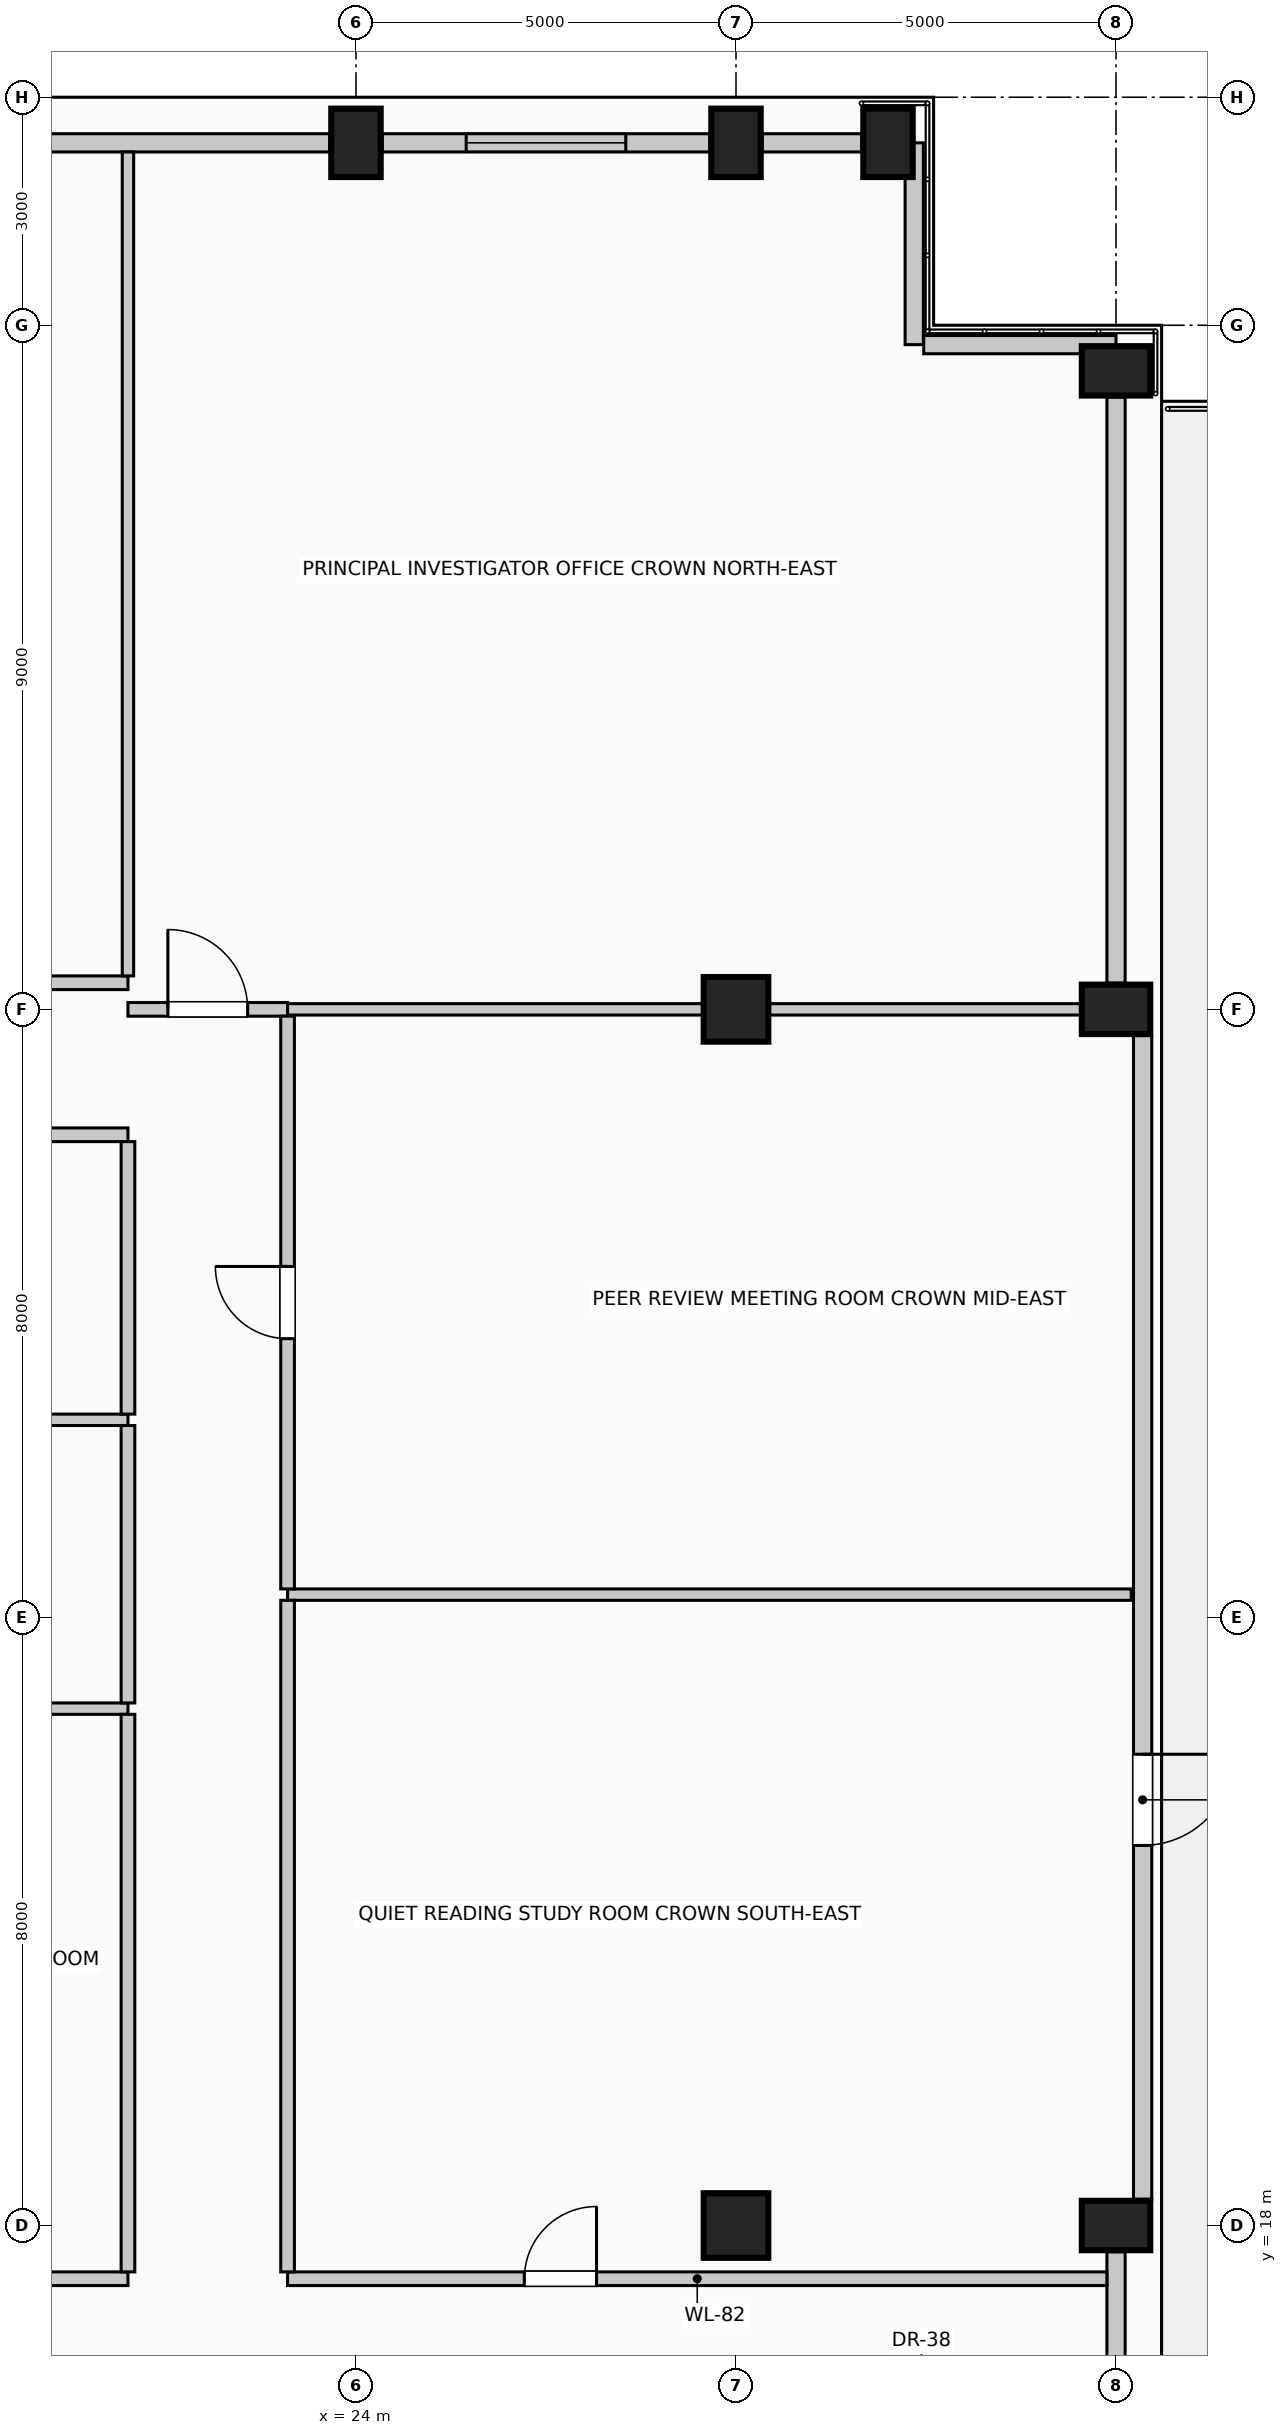
"""IFC4 building model, lengths in metres.
Left out: names, types, materials, properties, quantities, classifications, styles, units other than length and angle.
Written with IfcOpenShell. Run it as: python <this file> out.ifc"""

import sys

from ifc_helpers import new_model, si_unit, direction, frame, frame_2d, origin, origin_2d, place, context, subcontext, project, spatial, rectangle, circle, extrude, element, fill, save


model = new_model("IFC4")
c1 = context("Model", 3, precision=1e-05, world=origin(), true_north=direction((0.0, 1.0)))
c2 = subcontext(c1, "Body", "Model", "MODEL_VIEW")
j1 = project(units=[si_unit("LENGTHUNIT", "METRE"), si_unit("PLANEANGLEUNIT", "RADIAN")], contexts=[c1])
p1 = place(None, origin())
s1 = spatial("IfcSite", under=j1, at=p1, CompositionType="ELEMENT")
p2 = place(p1, origin())
s2 = spatial("IfcBuilding", under=s1, at=p2, CompositionType="ELEMENT")
p3 = place(p2, frame((0.0, 0.0, 305.0)))
s3 = spatial("IfcBuildingStorey", under=s2, at=p3, CompositionType="ELEMENT", Elevation=305.0)
for number, where, z_axis, x_axis in (
    (1, (24.0, 45.4, 0.0), (0.0, 0.0, 1.0), (1.0, 0.0, 0.0)),
    (2, (29.0, 45.4, 0.0), (0.0, 0.0, 1.0), (1.0, 0.0, 0.0)),
    (3, (31.0, 45.4, 0.0), (0.0, 0.0, 1.0), (1.0, 0.0, 0.0)),
    (4, (34.0, 18.0, 0.0), (0.0, 0.0, 1.0), (0.0, 1.0, 0.0)),
    (5, (34.0, 34.0, 0.0), (0.0, 0.0, 1.0), (0.0, 1.0, 0.0)),
    (6, (34.0, 42.4, 0.0), (0.0, 0.0, 1.0), (0.0, 1.0, 0.0)),
):
    element("IfcColumn", number, at=place(p3, frame(where, z_axis=z_axis, x_axis=x_axis)), inside=s3, PredefinedType="COLUMN", context=c2, shape_type="SweptSolid", body=[
        extrude(rectangle(XDim=0.65, YDim=0.9, at=origin_2d()), origin(), (0.0, 0.0, 1.0), 4.0),
    ])
for number, where, z_axis, x_axis in (
    (7, (29.0, 18.0, 0.0), (0.0, 0.0, 1.0), (1.0, 0.0, 0.0)),
    (8, (29.0, 34.0, 0.0), (0.0, 0.0, 1.0), (1.0, 0.0, 0.0)),
):
    element("IfcColumn", number, at=place(p3, frame(where, z_axis=z_axis, x_axis=x_axis)), inside=s3, PredefinedType="COLUMN", context=c2, shape_type="SweptSolid", body=[
        extrude(circle(Radius=0.425, at=origin_2d()), origin(), (0.0, 0.0, 1.0), 4.0),
    ])
p4 = place(p3, frame((16.745, 45.4, 0.0), z_axis=(0.0, 0.0, 1.0), x_axis=(1.0, 0.0, 0.0)))
e9 = element("IfcWall", 9, at=p4, inside=s3, PredefinedType="SOLIDWALL", context=c2, shape_type="SweptSolid", body=[
    extrude(rectangle(XDim=6.91, YDim=0.24, at=frame_2d((3.455, 0.0))), origin(), (0.0, 0.0, 1.0), 3.025),
])
p5 = place(p3, frame((24.345, 45.4, 0.0), z_axis=(0.0, 0.0, 1.0), x_axis=(1.0, 0.0, 0.0)))
e10 = element("IfcWall", 10, at=p5, inside=s3, PredefinedType="SOLIDWALL", context=c2, shape_type="SweptSolid", body=[
    extrude(rectangle(XDim=4.31, YDim=0.24, at=frame_2d((2.155, 0.0))), origin(), (0.0, 0.0, 1.0), 3.025),
])
p6 = place(p5, frame((1.105, 0.0, 0.35)))
e11 = element("IfcOpeningElement", 11, at=p6, cuts=e10, PredefinedType="OPENING", context=c2, shape_type="SweptSolid", body=[
    extrude(rectangle(XDim=2.1, YDim=2.2, at=frame_2d((1.05, 1.1))), frame((0.0, 0.13, 0.0), z_axis=(0.0, -1.0, 0.0), x_axis=(1.0, 0.0, 0.0)), (0.0, 0.0, 1.0), 0.26),
])
p7 = place(p3, frame((29.345, 45.4, 0.0), z_axis=(0.0, 0.0, 1.0), x_axis=(1.0, 0.0, 0.0)))
e12 = element("IfcWall", 12, at=p7, inside=s3, PredefinedType="SOLIDWALL", context=c2, shape_type="SweptSolid", body=[
    extrude(rectangle(XDim=1.31, YDim=0.24, at=frame_2d((0.655, 0.0))), origin(), (0.0, 0.0, 1.0), 3.025),
])
p8 = place(p3, frame((34.0, 17.655, 0.0), z_axis=(0.0, 0.0, 1.0), x_axis=(0.0, -1.0, 0.0)))
e13 = element("IfcWall", 13, at=p8, inside=s3, PredefinedType="SOLIDWALL", context=c2, shape_type="SweptSolid", body=[
    extrude(rectangle(XDim=13.71, YDim=0.24, at=frame_2d((6.855, 0.0))), origin(), (0.0, 0.0, 1.0), 3.025),
])
p9 = place(p8, frame((3.17, 0.0, 0.35)))
e14 = element("IfcOpeningElement", 14, at=p9, cuts=e13, PredefinedType="OPENING", context=c2, shape_type="SweptSolid", body=[
    extrude(rectangle(XDim=2.1, YDim=2.2, at=frame_2d((1.05, 1.1))), frame((0.0, 0.13, 0.0), z_axis=(0.0, -1.0, 0.0), x_axis=(1.0, 0.0, 0.0)), (0.0, 0.0, 1.0), 0.26),
])
p10 = place(p8, frame((8.44, 0.0, 0.35)))
e15 = element("IfcOpeningElement", 15, at=p10, cuts=e13, PredefinedType="OPENING", context=c2, shape_type="SweptSolid", body=[
    extrude(rectangle(XDim=2.1, YDim=2.2, at=frame_2d((1.05, 1.1))), frame((0.0, 0.13, 0.0), z_axis=(0.0, -1.0, 0.0), x_axis=(1.0, 0.0, 0.0)), (0.0, 0.0, 1.0), 0.26),
])
p11 = place(p3, frame((34.35, 33.655, 0.0), z_axis=(0.0, 0.0, 1.0), x_axis=(0.0, -1.0, 0.0)))
e16 = element("IfcWall", 16, at=p11, inside=s3, PredefinedType="SOLIDWALL", context=c2, shape_type="SweptSolid", body=[
    extrude(rectangle(XDim=15.31, YDim=0.24, at=frame_2d((7.655, 0.0))), origin(), (0.0, 0.0, 1.0), 3.775),
])
p12 = place(p11, frame((9.455, 0.0, 0.0)))
e17 = element("IfcOpeningElement", 17, at=p12, cuts=e16, PredefinedType="OPENING", context=c2, shape_type="SweptSolid", body=[
    extrude(rectangle(XDim=1.2, YDim=2.25, at=frame_2d((0.6, 1.125))), frame((0.0, 0.13, 0.0), z_axis=(0.0, -1.0, 0.0), x_axis=(1.0, 0.0, 0.0)), (0.0, 0.0, 1.0), 0.26),
])
p13 = place(p3, frame((34.0, 42.055, 0.0), z_axis=(0.0, 0.0, 1.0), x_axis=(0.0, -1.0, 0.0)))
e18 = element("IfcWall", 18, at=p13, inside=s3, PredefinedType="SOLIDWALL", context=c2, shape_type="SweptSolid", body=[
    extrude(rectangle(XDim=7.71, YDim=0.24, at=frame_2d((3.855, 0.0))), origin(), (0.0, 0.0, 1.0), 3.025),
])
p14 = place(p3, frame((31.345, 45.4, 0.0), z_axis=(0.0, 0.0, 1.0), x_axis=(0.0, -1.0, 0.0)))
e19 = element("IfcWall", 19, at=p14, inside=s3, PredefinedType="SOLIDWALL", context=c2, shape_type="SweptSolid", body=[
    extrude(rectangle(XDim=2.655, YDim=0.24, at=frame_2d((1.327, 0.0))), origin(), (0.0, 0.0, 1.0), 3.775),
])
p15 = place(p3, frame((31.47, 42.745, 0.0), z_axis=(0.0, 0.0, 1.0), x_axis=(1.0, 0.0, 0.0)))
e20 = element("IfcWall", 20, at=p15, inside=s3, PredefinedType="SOLIDWALL", context=c2, shape_type="SweptSolid", body=[
    extrude(rectangle(XDim=2.53, YDim=0.24, at=frame_2d((1.265, 0.0))), origin(), (0.0, 0.0, 1.0), 3.775),
])
p16 = place(p3, frame((15.85, 17.3, 0.0), z_axis=(0.0, 0.0, 1.0), x_axis=(1.0, 0.0, 0.0)))
e21 = element("IfcWall", 21, at=p16, inside=s3, PredefinedType="PARTITIONING", context=c2, shape_type="SweptSolid", body=[
    extrude(rectangle(XDim=5.15, YDim=0.18, at=frame_2d((2.575, 0.0))), origin(), (0.0, 0.0, 1.0), 3.775),
])
p17 = place(p16, frame((2.41, 0.0, 0.0)))
e22 = element("IfcOpeningElement", 22, at=p17, cuts=e21, PredefinedType="OPENING", context=c2, shape_type="SweptSolid", body=[
    extrude(rectangle(XDim=1.05, YDim=2.15, at=frame_2d((0.525, 1.075))), frame((0.0, 0.1, 0.0), z_axis=(0.0, -1.0, 0.0), x_axis=(1.0, 0.0, 0.0)), (0.0, 0.0, 1.0), 0.2),
])
p18 = place(p3, frame((23.1, 17.3, 0.0), z_axis=(0.0, 0.0, 1.0), x_axis=(1.0, 0.0, 0.0)))
e23 = element("IfcWall", 23, at=p18, inside=s3, PredefinedType="PARTITIONING", context=c2, shape_type="SweptSolid", body=[
    extrude(rectangle(XDim=10.78, YDim=0.18, at=frame_2d((5.39, 0.0))), origin(), (0.0, 0.0, 1.0), 3.775),
])
p19 = place(p18, frame((3.115, 0.0, 0.0)))
e24 = element("IfcOpeningElement", 24, at=p19, cuts=e23, PredefinedType="OPENING", context=c2, shape_type="SweptSolid", body=[
    extrude(rectangle(XDim=0.95, YDim=2.15, at=frame_2d((0.475, 1.075))), frame((0.0, 0.1, 0.0), z_axis=(0.0, -1.0, 0.0), x_axis=(1.0, 0.0, 0.0)), (0.0, 0.0, 1.0), 0.2),
])
p20 = place(p3, frame((15.85, 24.8, 0.0), z_axis=(0.0, 0.0, 1.0), x_axis=(1.0, 0.0, 0.0)))
e25 = element("IfcWall", 25, at=p20, inside=s3, PredefinedType="PARTITIONING", context=c2, shape_type="SweptSolid", body=[
    extrude(rectangle(XDim=5.15, YDim=0.15, at=frame_2d((2.575, 0.0))), origin(), (0.0, 0.0, 1.0), 3.775),
])
p21 = place(p3, frame((23.1, 26.3, 0.0), z_axis=(0.0, 0.0, 1.0), x_axis=(1.0, 0.0, 0.0)))
e26 = element("IfcWall", 26, at=p21, inside=s3, PredefinedType="PARTITIONING", context=c2, shape_type="SweptSolid", body=[
    extrude(rectangle(XDim=11.1, YDim=0.15, at=frame_2d((5.55, 0.0))), origin(), (0.0, 0.0, 1.0), 3.775),
])
p22 = place(p3, frame((12.2, 28.6, 0.0), z_axis=(0.0, 0.0, 1.0), x_axis=(1.0, 0.0, 0.0)))
e27 = element("IfcWall", 27, at=p22, inside=s3, PredefinedType="PARTITIONING", context=c2, shape_type="SweptSolid", body=[
    extrude(rectangle(XDim=8.8, YDim=0.15, at=frame_2d((4.4, 0.0))), origin(), (0.0, 0.0, 1.0), 3.775),
])
p23 = place(p3, frame((15.85, 32.35, 0.0), z_axis=(0.0, 0.0, 1.0), x_axis=(1.0, 0.0, 0.0)))
e28 = element("IfcWall", 28, at=p23, inside=s3, PredefinedType="PARTITIONING", context=c2, shape_type="SweptSolid", body=[
    extrude(rectangle(XDim=5.15, YDim=0.18, at=frame_2d((2.575, 0.0))), origin(), (0.0, 0.0, 1.0), 3.775),
])
p24 = place(p3, frame((21.0, 34.0, 0.0), z_axis=(0.0, 0.0, 1.0), x_axis=(1.0, 0.0, 0.0)))
e29 = element("IfcWall", 29, at=p24, inside=s3, PredefinedType="PARTITIONING", context=c2, shape_type="SweptSolid", body=[
    extrude(rectangle(XDim=2.1, YDim=0.18, at=frame_2d((1.05, 0.0))), origin(), (0.0, 0.0, 1.0), 3.27),
])
p25 = place(p24, frame((0.525, 0.0, 0.0)))
e30 = element("IfcOpeningElement", 30, at=p25, cuts=e29, PredefinedType="OPENING", context=c2, shape_type="SweptSolid", body=[
    extrude(rectangle(XDim=1.05, YDim=2.15, at=frame_2d((0.525, 1.075))), frame((0.0, 0.1, 0.0), z_axis=(0.0, -1.0, 0.0), x_axis=(1.0, 0.0, 0.0)), (0.0, 0.0, 1.0), 0.2),
])
p26 = place(p3, frame((23.1, 34.0, 0.0), z_axis=(0.0, 0.0, 1.0), x_axis=(1.0, 0.0, 0.0)))
e31 = element("IfcWall", 31, at=p26, inside=s3, PredefinedType="PARTITIONING", context=c2, shape_type="SweptSolid", body=[
    extrude(rectangle(XDim=5.475, YDim=0.15, at=frame_2d((2.737, 0.0))), origin(), (0.0, 0.0, 1.0), 3.27),
])
p27 = place(p3, frame((29.425, 34.0, 0.0), z_axis=(0.0, 0.0, 1.0), x_axis=(1.0, 0.0, 0.0)))
e32 = element("IfcWall", 32, at=p27, inside=s3, PredefinedType="PARTITIONING", context=c2, shape_type="SweptSolid", body=[
    extrude(rectangle(XDim=4.125, YDim=0.15, at=frame_2d((2.062, 0.0))), origin(), (0.0, 0.0, 1.0), 3.27),
])
p28 = place(p3, frame((17.0, 34.35, 0.0), z_axis=(0.0, 0.0, 1.0), x_axis=(1.0, 0.0, 0.0)))
e33 = element("IfcWall", 33, at=p28, inside=s3, PredefinedType="PARTITIONING", context=c2, shape_type="SweptSolid", body=[
    extrude(rectangle(XDim=4.0, YDim=0.18, at=frame_2d((2.0, 0.0))), origin(), (0.0, 0.0, 1.0), 3.775),
])
p29 = place(p28, frame((1.475, 0.0, 0.0)))
e34 = element("IfcOpeningElement", 34, at=p29, cuts=e33, PredefinedType="OPENING", context=c2, shape_type="SweptSolid", body=[
    extrude(rectangle(XDim=1.05, YDim=2.15, at=frame_2d((0.525, 1.075))), frame((0.0, 0.1, 0.0), z_axis=(0.0, -1.0, 0.0), x_axis=(1.0, 0.0, 0.0)), (0.0, 0.0, 1.0), 0.2),
])
p30 = place(p3, frame((21.0, 17.39, 0.0), z_axis=(0.0, 0.0, 1.0), x_axis=(0.0, 1.0, 0.0)))
e35 = element("IfcWall", 35, at=p30, inside=s3, PredefinedType="PARTITIONING", context=c2, shape_type="SweptSolid", body=[
    extrude(rectangle(XDim=7.335, YDim=0.18, at=frame_2d((3.667, 0.0))), origin(), (0.0, 0.0, 1.0), 3.775),
])
p31 = place(p3, frame((21.0, 24.875, 0.0), z_axis=(0.0, 0.0, 1.0), x_axis=(0.0, 1.0, 0.0)))
e36 = element("IfcWall", 36, at=p31, inside=s3, PredefinedType="PARTITIONING", context=c2, shape_type="SweptSolid", body=[
    extrude(rectangle(XDim=3.65, YDim=0.18, at=frame_2d((1.825, 0.0))), origin(), (0.0, 0.0, 1.0), 3.775),
])
p32 = place(p3, frame((21.0, 28.675, 0.0), z_axis=(0.0, 0.0, 1.0), x_axis=(0.0, 1.0, 0.0)))
e37 = element("IfcWall", 37, at=p32, inside=s3, PredefinedType="PARTITIONING", context=c2, shape_type="SweptSolid", body=[
    extrude(rectangle(XDim=3.585, YDim=0.18, at=frame_2d((1.792, 0.0))), origin(), (0.0, 0.0, 1.0), 3.775),
])
p33 = place(p3, frame((21.0, 34.44, 0.0), z_axis=(0.0, 0.0, 1.0), x_axis=(0.0, 1.0, 0.0)))
e38 = element("IfcWall", 38, at=p33, inside=s3, PredefinedType="PARTITIONING", context=c2, shape_type="SweptSolid", body=[
    extrude(rectangle(XDim=10.84, YDim=0.15, at=frame_2d((5.42, 0.0))), origin(), (0.0, 0.0, 1.0), 3.775),
])
p34 = place(p3, frame((23.1, 17.39, 0.0), z_axis=(0.0, 0.0, 1.0), x_axis=(0.0, 1.0, 0.0)))
e39 = element("IfcWall", 39, at=p34, inside=s3, PredefinedType="PARTITIONING", context=c2, shape_type="SweptSolid", body=[
    extrude(rectangle(XDim=8.835, YDim=0.18, at=frame_2d((4.417, 0.0))), origin(), (0.0, 0.0, 1.0), 3.775),
])
p35 = place(p3, frame((23.1, 26.375, 0.0), z_axis=(0.0, 0.0, 1.0), x_axis=(0.0, 1.0, 0.0)))
e40 = element("IfcWall", 40, at=p35, inside=s3, PredefinedType="PARTITIONING", context=c2, shape_type="SweptSolid", body=[
    extrude(rectangle(XDim=7.535, YDim=0.18, at=frame_2d((3.768, 0.0))), origin(), (0.0, 0.0, 1.0), 3.775),
])
p36 = place(p35, frame((3.292, 0.0, 0.0)))
e41 = element("IfcOpeningElement", 41, at=p36, cuts=e40, PredefinedType="OPENING", context=c2, shape_type="SweptSolid", body=[
    extrude(rectangle(XDim=0.95, YDim=2.15, at=frame_2d((0.475, 1.075))), frame((0.0, 0.1, 0.0), z_axis=(0.0, -1.0, 0.0), x_axis=(1.0, 0.0, 0.0)), (0.0, 0.0, 1.0), 0.2),
])
p37 = place(p6, origin())
e42 = element("IfcWindow", 42, at=p37, inside=s3, PartitioningType="SINGLE_PANEL", PredefinedType="WINDOW", context=c2, shape_type="SweptSolid", body=[
    extrude(rectangle(XDim=2.1, YDim=2.2, at=frame_2d((1.05, 1.1))), frame((0.0, 0.03, 0.0), z_axis=(0.0, -1.0, 0.0), x_axis=(1.0, 0.0, 0.0)), (0.0, 0.0, 1.0), 0.06),
])
fill(e11, e42)
p38 = place(p12, origin())
e43 = element("IfcDoor", 43, at=p38, inside=s3, OperationType="SINGLE_SWING_LEFT", PredefinedType="DOOR", context=c2, shape_type="SweptSolid", body=[
    extrude(rectangle(XDim=1.2, YDim=2.25, at=frame_2d((0.6, 1.125))), frame((0.0, 0.025, 0.0), z_axis=(0.0, -1.0, 0.0), x_axis=(1.0, 0.0, 0.0)), (0.0, 0.0, 1.0), 0.05),
])
fill(e17, e43)
p39 = place(p19, origin())
e44 = element("IfcDoor", 44, at=p39, inside=s3, OperationType="SINGLE_SWING_RIGHT", PredefinedType="DOOR", context=c2, shape_type="SweptSolid", body=[
    extrude(rectangle(XDim=0.95, YDim=2.15, at=frame_2d((0.475, 1.075))), frame((0.0, 0.025, 0.0), z_axis=(0.0, -1.0, 0.0), x_axis=(1.0, 0.0, 0.0)), (0.0, 0.0, 1.0), 0.05),
])
fill(e24, e44)
p40 = place(p25, origin())
e45 = element("IfcDoor", 45, at=p40, inside=s3, OperationType="SINGLE_SWING_LEFT", PredefinedType="DOOR", context=c2, shape_type="SweptSolid", body=[
    extrude(rectangle(XDim=1.05, YDim=2.15, at=frame_2d((0.525, 1.075))), frame((0.0, 0.025, 0.0), z_axis=(0.0, -1.0, 0.0), x_axis=(1.0, 0.0, 0.0)), (0.0, 0.0, 1.0), 0.05),
])
fill(e30, e45)
p41 = place(p36, origin())
e46 = element("IfcDoor", 46, at=p41, inside=s3, OperationType="SINGLE_SWING_RIGHT", PredefinedType="DOOR", context=c2, shape_type="SweptSolid", body=[
    extrude(rectangle(XDim=0.95, YDim=2.15, at=frame_2d((0.475, 1.075))), frame((0.0, 0.025, 0.0), z_axis=(0.0, -1.0, 0.0), x_axis=(1.0, 0.0, 0.0)), (0.0, 0.0, 1.0), 0.05),
])
fill(e41, e46)
save(model, sys.argv[1])
